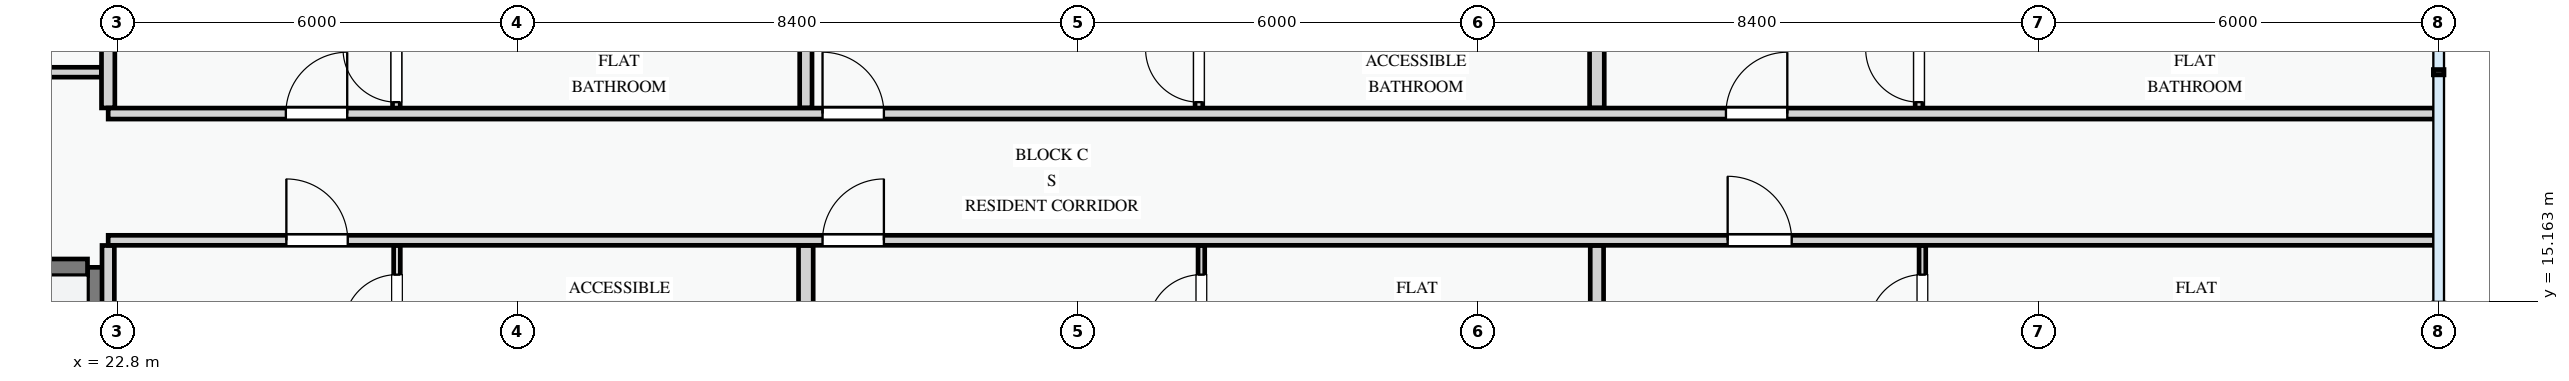
"""IFC4 building model, lengths in metres.
Left out: names, types, materials, properties, quantities, classifications, styles, units other than length and angle.
Written with IfcOpenShell. Run it as: python <this file> out.ifc"""

import sys

from ifc_helpers import new_model, si_unit, direction, frame, frame_2d, origin, place, context, subcontext, project, spatial, rectangle, extrude, element, fill, save


model = new_model("IFC4")
c1 = context("Model", 3, precision=1e-05, world=origin(), true_north=direction((0.0, 1.0)))
c2 = subcontext(c1, "Body", "Model", "MODEL_VIEW")
j1 = project(units=[si_unit("LENGTHUNIT", "METRE"), si_unit("PLANEANGLEUNIT", "RADIAN")], contexts=[c1])
p1 = place(None, origin())
s1 = spatial("IfcSite", under=j1, at=p1, CompositionType="ELEMENT")
p2 = place(p1, origin())
s2 = spatial("IfcBuilding", under=s1, at=p2, CompositionType="ELEMENT")
p3 = place(p2, frame((0.0, 0.0, 18.0)))
s3 = spatial("IfcBuildingStorey", under=s2, at=p3, CompositionType="ELEMENT", Elevation=18.0)
p4 = place(p3, frame((22.475, 8.75, 0.0), z_axis=(0.0, 0.0, 1.0), x_axis=(0.0, 1.0, 0.0)))
e1 = element("IfcWall", 1, at=p4, inside=s3, PredefinedType="SHEAR", context=c2, shape_type="SweptSolid", body=[
    extrude(rectangle(XDim=6.925, YDim=0.25, at=frame_2d((3.462, 0.0))), origin(), (0.0, 0.0, 1.0), 3.0),
])
p5 = place(p3, frame((8.85, 15.675, 0.0), z_axis=(0.0, 0.0, 1.0), x_axis=(1.0, 0.0, 0.0)))
e2 = element("IfcWall", 2, at=p5, inside=s3, PredefinedType="SHEAR", context=c2, shape_type="SweptSolid", body=[
    extrude(rectangle(XDim=13.5, YDim=0.25, at=frame_2d((6.75, 0.0))), origin(), (0.0, 0.0, 1.0), 3.0),
])
p6 = place(p5, frame((6.2, 0.0, 0.0)))
e3 = element("IfcOpeningElement", 3, at=p6, cuts=e2, PredefinedType="OPENING", context=c2, shape_type="SweptSolid", body=[
    extrude(rectangle(XDim=1.1, YDim=2.15, at=frame_2d((0.55, 1.075))), frame((0.0, 0.135, 0.0), z_axis=(0.0, -1.0, 0.0), x_axis=(1.0, 0.0, 0.0)), (0.0, 0.0, 1.0), 0.27),
])
p7 = place(p3, frame((18.025, 18.6, 0.0), z_axis=(0.0, 0.0, 1.0), x_axis=(1.0, 0.0, 0.0)))
e4 = element("IfcWall", 4, at=p7, inside=s3, PredefinedType="PARTITIONING", context=c2, shape_type="SweptSolid", body=[
    extrude(rectangle(XDim=4.533, YDim=0.148, at=frame_2d((2.267, 0.0))), origin(), (0.0, 0.0, 1.0), 3.0),
])
p8 = place(p7, frame((1.65, 0.0, 0.0)))
e5 = element("IfcOpeningElement", 5, at=p8, cuts=e4, PredefinedType="OPENING", context=c2, shape_type="SweptSolid", body=[
    extrude(rectangle(XDim=1.0, YDim=2.15, at=frame_2d((0.5, 1.075))), frame((0.0, 0.084, 0.0), z_axis=(0.0, -1.0, 0.0), x_axis=(1.0, 0.0, 0.0)), (0.0, 0.0, 1.0), 0.168),
])
p9 = place(p3, frame((26.99, 8.554, 0.0), z_axis=(0.0, 0.0, 1.0), x_axis=(0.0, 1.0, 0.0)))
e6 = element("IfcWall", 6, at=p9, inside=s3, PredefinedType="PARTITIONING", context=c2, shape_type="SweptSolid", body=[
    extrude(rectangle(XDim=7.448, YDim=0.1, at=frame_2d((3.724, 0.0))), origin(), (0.0, 0.0, 1.0), 3.0),
])
p10 = place(p9, frame((1.309, 0.0, 0.0)))
e7 = element("IfcOpeningElement", 7, at=p10, cuts=e6, PredefinedType="OPENING", context=c2, shape_type="SweptSolid", body=[
    extrude(rectangle(XDim=0.85, YDim=2.1, at=frame_2d((0.425, 1.05))), frame((0.0, 0.06, 0.0), z_axis=(0.0, -1.0, 0.0), x_axis=(1.0, 0.0, 0.0)), (0.0, 0.0, 1.0), 0.12),
])
p11 = place(p9, frame((4.205, 0.0, 0.0)))
e8 = element("IfcOpeningElement", 8, at=p11, cuts=e6, PredefinedType="OPENING", context=c2, shape_type="SweptSolid", body=[
    extrude(rectangle(XDim=0.85, YDim=2.1, at=frame_2d((0.425, 1.05))), frame((0.0, 0.06, 0.0), z_axis=(0.0, -1.0, 0.0), x_axis=(1.0, 0.0, 0.0)), (0.0, 0.0, 1.0), 0.12),
])
p12 = place(p9, frame((6.211, 0.0, 0.0)))
e9 = element("IfcOpeningElement", 9, at=p12, cuts=e6, PredefinedType="OPENING", context=c2, shape_type="SweptSolid", body=[
    extrude(rectangle(XDim=0.8, YDim=2.1, at=frame_2d((0.4, 1.05))), frame((0.0, 0.06, 0.0), z_axis=(0.0, -1.0, 0.0), x_axis=(1.0, 0.0, 0.0)), (0.0, 0.0, 1.0), 0.12),
])
p13 = place(p3, frame((26.981, 17.98, 0.0), z_axis=(0.0, 0.0, 1.0), x_axis=(0.0, 1.0, 0.0)))
e10 = element("IfcWall", 10, at=p13, inside=s3, PredefinedType="PARTITIONING", context=c2, shape_type="SweptSolid", body=[
    extrude(rectangle(XDim=4.666, YDim=0.115, at=frame_2d((2.333, 0.0))), origin(), (0.0, 0.0, 1.0), 3.0),
])
p14 = place(p13, frame((0.171, 0.0, 0.0)))
e11 = element("IfcOpeningElement", 11, at=p14, cuts=e10, PredefinedType="OPENING", context=c2, shape_type="SweptSolid", body=[
    extrude(rectangle(XDim=0.8, YDim=2.1, at=frame_2d((0.4, 1.05))), frame((0.0, 0.067, 0.0), z_axis=(0.0, -1.0, 0.0), x_axis=(1.0, 0.0, 0.0)), (0.0, 0.0, 1.0), 0.135),
])
p15 = place(p13, frame((1.384, 0.0, 0.0)))
e12 = element("IfcOpeningElement", 12, at=p15, cuts=e10, PredefinedType="OPENING", context=c2, shape_type="SweptSolid", body=[
    extrude(rectangle(XDim=0.85, YDim=2.1, at=frame_2d((0.425, 1.05))), frame((0.0, 0.067, 0.0), z_axis=(0.0, -1.0, 0.0), x_axis=(1.0, 0.0, 0.0)), (0.0, 0.0, 1.0), 0.135),
])
p16 = place(p13, frame((3.193, 0.0, 0.0)))
e13 = element("IfcOpeningElement", 13, at=p16, cuts=e10, PredefinedType="OPENING", context=c2, shape_type="SweptSolid", body=[
    extrude(rectangle(XDim=0.85, YDim=2.1, at=frame_2d((0.425, 1.05))), frame((0.0, 0.067, 0.0), z_axis=(0.0, -1.0, 0.0), x_axis=(1.0, 0.0, 0.0)), (0.0, 0.0, 1.0), 0.135),
])
p17 = place(p3, frame((22.66, 8.554, 0.0), z_axis=(0.0, 0.0, 1.0), x_axis=(0.0, 1.0, 0.0)))
e14 = element("IfcWall", 14, at=p17, inside=s3, PredefinedType="PARTITIONING", context=c2, shape_type="SweptSolid", body=[
    extrude(rectangle(XDim=7.448, YDim=0.185, at=frame_2d((3.724, 0.0))), origin(), (0.0, 0.0, 1.0), 2.425),
])
p18 = place(p3, frame((22.66, 18.064, 0.0), z_axis=(0.0, 0.0, 1.0), x_axis=(0.0, 1.0, 0.0)))
e15 = element("IfcWall", 15, at=p18, inside=s3, PredefinedType="PARTITIONING", context=c2, shape_type="SweptSolid", body=[
    extrude(rectangle(XDim=4.676, YDim=0.2, at=frame_2d((2.338, 0.0))), origin(), (0.0, 0.0, 1.0), 2.425),
])
p19 = place(p3, frame((39.05, 8.554, 0.0), z_axis=(0.0, 0.0, 1.0), x_axis=(0.0, 1.0, 0.0)))
e16 = element("IfcWall", 16, at=p19, inside=s3, PredefinedType="PARTITIONING", context=c2, shape_type="SweptSolid", body=[
    extrude(rectangle(XDim=7.448, YDim=0.1, at=frame_2d((3.724, 0.0))), origin(), (0.0, 0.0, 1.0), 3.0),
])
p20 = place(p19, frame((1.309, 0.0, 0.0)))
e17 = element("IfcOpeningElement", 17, at=p20, cuts=e16, PredefinedType="OPENING", context=c2, shape_type="SweptSolid", body=[
    extrude(rectangle(XDim=0.82, YDim=2.08, at=frame_2d((0.41, 1.04))), frame((0.0, 0.06, 0.0), z_axis=(0.0, -1.0, 0.0), x_axis=(1.0, 0.0, 0.0)), (0.0, 0.0, 1.0), 0.12),
])
p21 = place(p19, frame((4.205, 0.0, 0.0)))
e18 = element("IfcOpeningElement", 18, at=p21, cuts=e16, PredefinedType="OPENING", context=c2, shape_type="SweptSolid", body=[
    extrude(rectangle(XDim=0.85, YDim=2.1, at=frame_2d((0.425, 1.05))), frame((0.0, 0.06, 0.0), z_axis=(0.0, -1.0, 0.0), x_axis=(1.0, 0.0, 0.0)), (0.0, 0.0, 1.0), 0.12),
])
p22 = place(p19, frame((6.211, 0.0, 0.0)))
e19 = element("IfcOpeningElement", 19, at=p22, cuts=e16, PredefinedType="OPENING", context=c2, shape_type="SweptSolid", body=[
    extrude(rectangle(XDim=0.8, YDim=2.1, at=frame_2d((0.4, 1.05))), frame((0.0, 0.06, 0.0), z_axis=(0.0, -1.0, 0.0), x_axis=(1.0, 0.0, 0.0)), (0.0, 0.0, 1.0), 0.12),
])
p23 = place(p3, frame((39.013, 17.98, 0.0), z_axis=(0.0, 0.0, 1.0), x_axis=(0.0, 1.0, 0.0)))
e20 = element("IfcWall", 20, at=p23, inside=s3, PredefinedType="PARTITIONING", context=c2, shape_type="SweptSolid", body=[
    extrude(rectangle(XDim=4.666, YDim=0.115, at=frame_2d((2.333, 0.0))), origin(), (0.0, 0.0, 1.0), 3.0),
])
p24 = place(p23, frame((0.171, 0.0, 0.0)))
e21 = element("IfcOpeningElement", 21, at=p24, cuts=e20, PredefinedType="OPENING", context=c2, shape_type="SweptSolid", body=[
    extrude(rectangle(XDim=0.8, YDim=2.1, at=frame_2d((0.4, 1.05))), frame((0.0, 0.067, 0.0), z_axis=(0.0, -1.0, 0.0), x_axis=(1.0, 0.0, 0.0)), (0.0, 0.0, 1.0), 0.135),
])
p25 = place(p23, frame((1.384, 0.0, 0.0)))
e22 = element("IfcOpeningElement", 22, at=p25, cuts=e20, PredefinedType="OPENING", context=c2, shape_type="SweptSolid", body=[
    extrude(rectangle(XDim=0.82, YDim=2.08, at=frame_2d((0.41, 1.04))), frame((0.0, 0.067, 0.0), z_axis=(0.0, -1.0, 0.0), x_axis=(1.0, 0.0, 0.0)), (0.0, 0.0, 1.0), 0.135),
])
p26 = place(p23, frame((3.193, 0.0, 0.0)))
e23 = element("IfcOpeningElement", 23, at=p26, cuts=e20, PredefinedType="OPENING", context=c2, shape_type="SweptSolid", body=[
    extrude(rectangle(XDim=0.85, YDim=2.1, at=frame_2d((0.425, 1.05))), frame((0.0, 0.067, 0.0), z_axis=(0.0, -1.0, 0.0), x_axis=(1.0, 0.0, 0.0)), (0.0, 0.0, 1.0), 0.135),
])
p27 = place(p3, frame((33.12, 8.554, 0.0), z_axis=(0.0, 0.0, 1.0), x_axis=(0.0, 1.0, 0.0)))
e24 = element("IfcWall", 24, at=p27, inside=s3, PredefinedType="PARTITIONING", context=c2, shape_type="SweptSolid", body=[
    extrude(rectangle(XDim=7.448, YDim=0.22, at=frame_2d((3.724, 0.0))), origin(), (0.0, 0.0, 1.0), 2.585),
])
p28 = place(p3, frame((33.12, 18.064, 0.0), z_axis=(0.0, 0.0, 1.0), x_axis=(0.0, 1.0, 0.0)))
e25 = element("IfcWall", 25, at=p28, inside=s3, PredefinedType="PARTITIONING", context=c2, shape_type="SweptSolid", body=[
    extrude(rectangle(XDim=4.581, YDim=0.185, at=frame_2d((2.291, 0.0))), origin(), (0.0, 0.0, 1.0), 2.585),
])
p29 = place(p3, frame((49.86, 8.554, 0.0), z_axis=(0.0, 0.0, 1.0), x_axis=(0.0, 1.0, 0.0)))
e26 = element("IfcWall", 26, at=p29, inside=s3, PredefinedType="PARTITIONING", context=c2, shape_type="SweptSolid", body=[
    extrude(rectangle(XDim=7.448, YDim=0.1, at=frame_2d((3.724, 0.0))), origin(), (0.0, 0.0, 1.0), 3.0),
])
p30 = place(p29, frame((1.309, 0.0, 0.0)))
e27 = element("IfcOpeningElement", 27, at=p30, cuts=e26, PredefinedType="OPENING", context=c2, shape_type="SweptSolid", body=[
    extrude(rectangle(XDim=0.85, YDim=2.1, at=frame_2d((0.425, 1.05))), frame((0.0, 0.06, 0.0), z_axis=(0.0, -1.0, 0.0), x_axis=(1.0, 0.0, 0.0)), (0.0, 0.0, 1.0), 0.12),
])
p31 = place(p29, frame((4.205, 0.0, 0.0)))
e28 = element("IfcOpeningElement", 28, at=p31, cuts=e26, PredefinedType="OPENING", context=c2, shape_type="SweptSolid", body=[
    extrude(rectangle(XDim=0.85, YDim=2.1, at=frame_2d((0.425, 1.05))), frame((0.0, 0.06, 0.0), z_axis=(0.0, -1.0, 0.0), x_axis=(1.0, 0.0, 0.0)), (0.0, 0.0, 1.0), 0.12),
])
p32 = place(p29, frame((6.211, 0.0, 0.0)))
e29 = element("IfcOpeningElement", 29, at=p32, cuts=e26, PredefinedType="OPENING", context=c2, shape_type="SweptSolid", body=[
    extrude(rectangle(XDim=0.8, YDim=2.1, at=frame_2d((0.4, 1.05))), frame((0.0, 0.06, 0.0), z_axis=(0.0, -1.0, 0.0), x_axis=(1.0, 0.0, 0.0)), (0.0, 0.0, 1.0), 0.12),
])
p33 = place(p3, frame((49.809, 17.98, 0.0), z_axis=(0.0, 0.0, 1.0), x_axis=(0.0, 1.0, 0.0)))
e30 = element("IfcWall", 30, at=p33, inside=s3, PredefinedType="PARTITIONING", context=c2, shape_type="SweptSolid", body=[
    extrude(rectangle(XDim=4.76, YDim=0.115, at=frame_2d((2.38, 0.0))), origin(), (0.0, 0.0, 1.0), 3.0),
])
p34 = place(p33, frame((0.171, 0.0, 0.0)))
e31 = element("IfcOpeningElement", 31, at=p34, cuts=e30, PredefinedType="OPENING", context=c2, shape_type="SweptSolid", body=[
    extrude(rectangle(XDim=0.8, YDim=2.1, at=frame_2d((0.4, 1.05))), frame((0.0, 0.067, 0.0), z_axis=(0.0, -1.0, 0.0), x_axis=(1.0, 0.0, 0.0)), (0.0, 0.0, 1.0), 0.135),
])
p35 = place(p33, frame((1.384, 0.0, 0.0)))
e32 = element("IfcOpeningElement", 32, at=p35, cuts=e30, PredefinedType="OPENING", context=c2, shape_type="SweptSolid", body=[
    extrude(rectangle(XDim=0.85, YDim=2.1, at=frame_2d((0.425, 1.05))), frame((0.0, 0.067, 0.0), z_axis=(0.0, -1.0, 0.0), x_axis=(1.0, 0.0, 0.0)), (0.0, 0.0, 1.0), 0.135),
])
p36 = place(p33, frame((3.193, 0.0, 0.0)))
e33 = element("IfcOpeningElement", 33, at=p36, cuts=e30, PredefinedType="OPENING", context=c2, shape_type="SweptSolid", body=[
    extrude(rectangle(XDim=0.85, YDim=2.1, at=frame_2d((0.425, 1.05))), frame((0.0, 0.067, 0.0), z_axis=(0.0, -1.0, 0.0), x_axis=(1.0, 0.0, 0.0)), (0.0, 0.0, 1.0), 0.135),
])
p37 = place(p3, frame((44.98, 8.554, 0.0), z_axis=(0.0, 0.0, 1.0), x_axis=(0.0, 1.0, 0.0)))
e34 = element("IfcWall", 34, at=p37, inside=s3, PredefinedType="PARTITIONING", context=c2, shape_type="SweptSolid", body=[
    extrude(rectangle(XDim=7.448, YDim=0.2, at=frame_2d((3.724, 0.0))), origin(), (0.0, 0.0, 1.0), 3.0),
])
p38 = place(p3, frame((44.98, 18.064, 0.0), z_axis=(0.0, 0.0, 1.0), x_axis=(0.0, 1.0, 0.0)))
e35 = element("IfcWall", 35, at=p38, inside=s3, PredefinedType="PARTITIONING", context=c2, shape_type="SweptSolid", body=[
    extrude(rectangle(XDim=4.676, YDim=0.22, at=frame_2d((2.338, 0.0))), origin(), (0.0, 0.0, 1.0), 3.0),
])
p39 = place(p3, frame((22.66, 16.08, 0.0), z_axis=(0.0, 0.0, 1.0), x_axis=(1.0, 0.0, 0.0)))
e36 = element("IfcWall", 36, at=p39, inside=s3, PredefinedType="PARTITIONING", context=c2, shape_type="SweptSolid", body=[
    extrude(rectangle(XDim=34.88, YDim=0.15, at=frame_2d((17.44, 0.0))), origin(), (0.0, 0.0, 1.0), 3.0),
])
p40 = place(p39, frame((2.672, 0.0, 0.0)))
e37 = element("IfcOpeningElement", 37, at=p40, cuts=e36, PredefinedType="OPENING", context=c2, shape_type="SweptSolid", body=[
    extrude(rectangle(XDim=0.92, YDim=2.1, at=frame_2d((0.46, 1.05))), frame((0.0, 0.085, 0.0), z_axis=(0.0, -1.0, 0.0), x_axis=(1.0, 0.0, 0.0)), (0.0, 0.0, 1.0), 0.17),
])
p41 = place(p39, frame((10.71, 0.0, 0.0)))
e38 = element("IfcOpeningElement", 38, at=p41, cuts=e36, PredefinedType="OPENING", context=c2, shape_type="SweptSolid", body=[
    extrude(rectangle(XDim=0.92, YDim=2.1, at=frame_2d((0.46, 1.05))), frame((0.0, 0.085, 0.0), z_axis=(0.0, -1.0, 0.0), x_axis=(1.0, 0.0, 0.0)), (0.0, 0.0, 1.0), 0.17),
])
p42 = place(p39, frame((24.28, 0.0, 0.0)))
e39 = element("IfcOpeningElement", 39, at=p42, cuts=e36, PredefinedType="OPENING", context=c2, shape_type="SweptSolid", body=[
    extrude(rectangle(XDim=0.96, YDim=2.12, at=frame_2d((0.48, 1.06))), frame((0.0, 0.085, 0.0), z_axis=(0.0, -1.0, 0.0), x_axis=(1.0, 0.0, 0.0)), (0.0, 0.0, 1.0), 0.17),
])
p43 = place(p3, frame((22.66, 17.98, 0.0), z_axis=(0.0, 0.0, 1.0), x_axis=(1.0, 0.0, 0.0)))
e40 = element("IfcWall", 40, at=p43, inside=s3, PredefinedType="PARTITIONING", context=c2, shape_type="SweptSolid", body=[
    extrude(rectangle(XDim=34.88, YDim=0.165, at=frame_2d((17.44, 0.0))), origin(), (0.0, 0.0, 1.0), 3.0),
])
p44 = place(p43, frame((2.664, 0.0, 0.0)))
e41 = element("IfcOpeningElement", 41, at=p44, cuts=e40, PredefinedType="OPENING", context=c2, shape_type="SweptSolid", body=[
    extrude(rectangle(XDim=0.92, YDim=2.1, at=frame_2d((0.46, 1.05))), frame((0.0, 0.093, 0.0), z_axis=(0.0, -1.0, 0.0), x_axis=(1.0, 0.0, 0.0)), (0.0, 0.0, 1.0), 0.185),
])
p45 = place(p43, frame((10.71, 0.0, 0.0)))
e42 = element("IfcOpeningElement", 42, at=p45, cuts=e40, PredefinedType="OPENING", context=c2, shape_type="SweptSolid", body=[
    extrude(rectangle(XDim=0.92, YDim=2.1, at=frame_2d((0.46, 1.05))), frame((0.0, 0.093, 0.0), z_axis=(0.0, -1.0, 0.0), x_axis=(1.0, 0.0, 0.0)), (0.0, 0.0, 1.0), 0.185),
])
p46 = place(p43, frame((24.254, 0.0, 0.0)))
e43 = element("IfcOpeningElement", 43, at=p46, cuts=e40, PredefinedType="OPENING", context=c2, shape_type="SweptSolid", body=[
    extrude(rectangle(XDim=0.92, YDim=2.1, at=frame_2d((0.46, 1.05))), frame((0.0, 0.093, 0.0), z_axis=(0.0, -1.0, 0.0), x_axis=(1.0, 0.0, 0.0)), (0.0, 0.0, 1.0), 0.185),
])
p47 = place(p12, origin())
e44 = element("IfcDoor", 44, at=p47, inside=s3, OperationType="SINGLE_SWING_LEFT", PredefinedType="DOOR", context=c2, shape_type="SweptSolid", body=[
    extrude(rectangle(XDim=0.8, YDim=2.1, at=frame_2d((0.4, 1.05))), frame((0.0, 0.025, 0.0), z_axis=(0.0, -1.0, 0.0), x_axis=(1.0, 0.0, 0.0)), (0.0, 0.0, 1.0), 0.05),
])
fill(e9, e44)
p48 = place(p14, origin())
e45 = element("IfcDoor", 45, at=p48, inside=s3, OperationType="SINGLE_SWING_RIGHT", PredefinedType="DOOR", context=c2, shape_type="SweptSolid", body=[
    extrude(rectangle(XDim=0.8, YDim=2.1, at=frame_2d((0.4, 1.05))), frame((0.0, 0.025, 0.0), z_axis=(0.0, -1.0, 0.0), x_axis=(1.0, 0.0, 0.0)), (0.0, 0.0, 1.0), 0.05),
])
fill(e11, e45)
p49 = place(p22, origin())
e46 = element("IfcDoor", 46, at=p49, inside=s3, OperationType="SINGLE_SWING_LEFT", PredefinedType="DOOR", context=c2, shape_type="SweptSolid", body=[
    extrude(rectangle(XDim=0.8, YDim=2.1, at=frame_2d((0.4, 1.05))), frame((0.0, 0.025, 0.0), z_axis=(0.0, -1.0, 0.0), x_axis=(1.0, 0.0, 0.0)), (0.0, 0.0, 1.0), 0.05),
])
fill(e19, e46)
p50 = place(p24, origin())
e47 = element("IfcDoor", 47, at=p50, inside=s3, OperationType="SINGLE_SWING_RIGHT", PredefinedType="DOOR", context=c2, shape_type="SweptSolid", body=[
    extrude(rectangle(XDim=0.8, YDim=2.1, at=frame_2d((0.4, 1.05))), frame((0.0, 0.025, 0.0), z_axis=(0.0, -1.0, 0.0), x_axis=(1.0, 0.0, 0.0)), (0.0, 0.0, 1.0), 0.05),
])
fill(e21, e47)
p51 = place(p32, origin())
e48 = element("IfcDoor", 48, at=p51, inside=s3, OperationType="SINGLE_SWING_LEFT", PredefinedType="DOOR", context=c2, shape_type="SweptSolid", body=[
    extrude(rectangle(XDim=0.8, YDim=2.1, at=frame_2d((0.4, 1.05))), frame((0.0, 0.025, 0.0), z_axis=(0.0, -1.0, 0.0), x_axis=(1.0, 0.0, 0.0)), (0.0, 0.0, 1.0), 0.05),
])
fill(e29, e48)
p52 = place(p34, origin())
e49 = element("IfcDoor", 49, at=p52, inside=s3, OperationType="SINGLE_SWING_RIGHT", PredefinedType="DOOR", context=c2, shape_type="SweptSolid", body=[
    extrude(rectangle(XDim=0.8, YDim=2.1, at=frame_2d((0.4, 1.05))), frame((0.0, 0.025, 0.0), z_axis=(0.0, -1.0, 0.0), x_axis=(1.0, 0.0, 0.0)), (0.0, 0.0, 1.0), 0.05),
])
fill(e31, e49)
p53 = place(p40, origin())
e50 = element("IfcDoor", 50, at=p53, inside=s3, OperationType="SINGLE_SWING_LEFT", PredefinedType="DOOR", context=c2, shape_type="SweptSolid", body=[
    extrude(rectangle(XDim=0.92, YDim=2.1, at=frame_2d((0.46, 1.05))), frame((0.0, 0.025, 0.0), z_axis=(0.0, -1.0, 0.0), x_axis=(1.0, 0.0, 0.0)), (0.0, 0.0, 1.0), 0.05),
])
fill(e37, e50)
p54 = place(p41, origin())
e51 = element("IfcDoor", 51, at=p54, inside=s3, OperationType="SINGLE_SWING_RIGHT", PredefinedType="DOOR", context=c2, shape_type="SweptSolid", body=[
    extrude(rectangle(XDim=0.92, YDim=2.1, at=frame_2d((0.46, 1.05))), frame((0.0, 0.025, 0.0), z_axis=(0.0, -1.0, 0.0), x_axis=(1.0, 0.0, 0.0)), (0.0, 0.0, 1.0), 0.05),
])
fill(e38, e51)
p55 = place(p42, origin())
e52 = element("IfcDoor", 52, at=p55, inside=s3, OperationType="SINGLE_SWING_LEFT", PredefinedType="DOOR", context=c2, shape_type="SweptSolid", body=[
    extrude(rectangle(XDim=0.96, YDim=2.12, at=frame_2d((0.48, 1.06))), frame((0.0, 0.025, 0.0), z_axis=(0.0, -1.0, 0.0), x_axis=(1.0, 0.0, 0.0)), (0.0, 0.0, 1.0), 0.05),
])
fill(e39, e52)
p56 = place(p44, origin())
e53 = element("IfcDoor", 53, at=p56, inside=s3, OperationType="SINGLE_SWING_RIGHT", PredefinedType="DOOR", context=c2, shape_type="SweptSolid", body=[
    extrude(rectangle(XDim=0.92, YDim=2.1, at=frame_2d((0.46, 1.05))), frame((0.0, 0.025, 0.0), z_axis=(0.0, -1.0, 0.0), x_axis=(1.0, 0.0, 0.0)), (0.0, 0.0, 1.0), 0.05),
])
fill(e41, e53)
p57 = place(p45, origin())
e54 = element("IfcDoor", 54, at=p57, inside=s3, OperationType="SINGLE_SWING_LEFT", PredefinedType="DOOR", context=c2, shape_type="SweptSolid", body=[
    extrude(rectangle(XDim=0.92, YDim=2.1, at=frame_2d((0.46, 1.05))), frame((0.0, 0.025, 0.0), z_axis=(0.0, -1.0, 0.0), x_axis=(1.0, 0.0, 0.0)), (0.0, 0.0, 1.0), 0.05),
])
fill(e42, e54)
p58 = place(p46, origin())
e55 = element("IfcDoor", 55, at=p58, inside=s3, OperationType="SINGLE_SWING_RIGHT", PredefinedType="DOOR", context=c2, shape_type="SweptSolid", body=[
    extrude(rectangle(XDim=0.92, YDim=2.1, at=frame_2d((0.46, 1.05))), frame((0.0, 0.025, 0.0), z_axis=(0.0, -1.0, 0.0), x_axis=(1.0, 0.0, 0.0)), (0.0, 0.0, 1.0), 0.05),
])
fill(e43, e55)
save(model, sys.argv[1])
